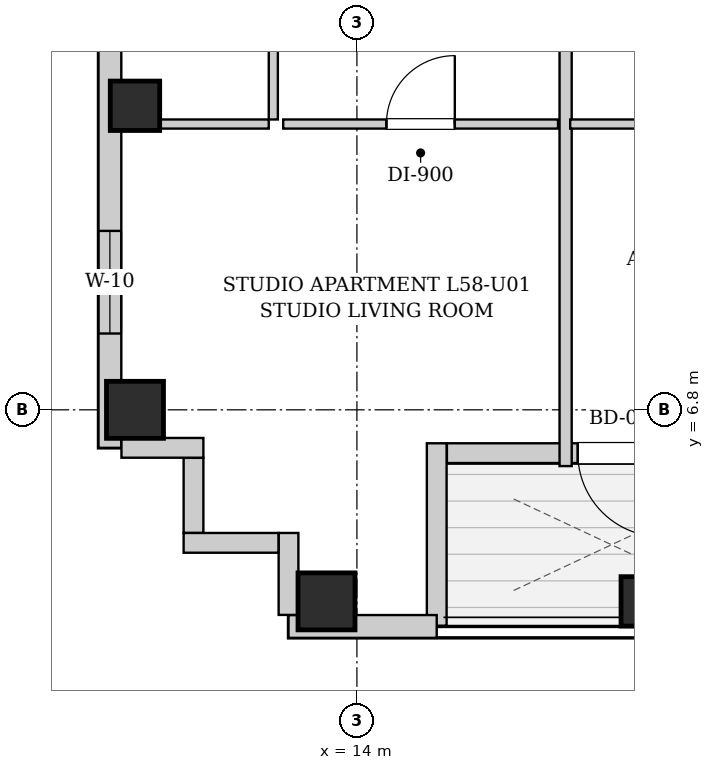
"""IFC4 building model, lengths in metres.
Left out: names, types, materials, properties, quantities, classifications, styles, units other than length and angle.
Written with IfcOpenShell. Run it as: python <this file> out.ifc"""

import sys

from ifc_helpers import new_model, si_unit, direction, frame, frame_2d, origin, origin_2d, place, context, subcontext, project, spatial, rectangle, extrude, element, fill, save


model = new_model("IFC4")
c1 = context("Model", 3, precision=1e-05, world=origin(), true_north=direction((0.0, 1.0)))
c2 = subcontext(c1, "Body", "Model", "MODEL_VIEW")
j1 = project(units=[si_unit("LENGTHUNIT", "METRE"), si_unit("PLANEANGLEUNIT", "RADIAN")], contexts=[c1])
p1 = place(None, origin())
s1 = spatial("IfcSite", under=j1, at=p1, CompositionType="ELEMENT")
p2 = place(p1, origin())
s2 = spatial("IfcBuilding", under=s1, at=p2, CompositionType="ELEMENT")
p3 = place(p2, frame((0.0, 0.0, 200.8)))
s3 = spatial("IfcBuildingStorey", under=s2, at=p3, CompositionType="ELEMENT", Elevation=200.8)
p4 = place(p3, frame((13.6, 4.28, 0.0), z_axis=(0.0, 0.0, 1.0), x_axis=(1.0, 0.0, 0.0)))
e1 = element("IfcColumn", 1, at=p4, inside=s3, PredefinedType="COLUMN", context=c2, shape_type="SweptSolid", body=[
    extrude(rectangle(XDim=0.75, YDim=0.75, at=origin_2d()), origin(), (0.0, 0.0, 1.0), 3.3),
])
p5 = place(p3, frame((17.8, 4.28, 0.0), z_axis=(0.0, 0.0, 1.0), x_axis=(1.0, 0.0, 0.0)))
e2 = element("IfcColumn", 2, at=p5, inside=s3, PredefinedType="COLUMN", context=c2, shape_type="SweptSolid", body=[
    extrude(rectangle(XDim=0.65, YDim=0.65, at=origin_2d()), origin(), (0.0, 0.0, 1.0), 3.3),
])
p6 = place(p3, frame((11.08, 6.8, 0.0), z_axis=(0.0, 0.0, 1.0), x_axis=(1.0, 0.0, 0.0)))
e3 = element("IfcColumn", 3, at=p6, inside=s3, PredefinedType="COLUMN", context=c2, shape_type="SweptSolid", body=[
    extrude(rectangle(XDim=0.75, YDim=0.75, at=origin_2d()), origin(), (0.0, 0.0, 1.0), 3.3),
])
p7 = place(p3, frame((11.08, 10.8, 0.0), z_axis=(0.0, 0.0, 1.0), x_axis=(1.0, 0.0, 0.0)))
e4 = element("IfcColumn", 4, at=p7, inside=s3, PredefinedType="COLUMN", context=c2, shape_type="SweptSolid", body=[
    extrude(rectangle(XDim=0.65, YDim=0.65, at=origin_2d()), origin(), (0.0, 0.0, 1.0), 3.3),
])
p8 = place(p3, frame((19.516, 6.23, 0.0), z_axis=(0.0, 0.0, 1.0), x_axis=(-1.0, 0.0, 0.0)))
e5 = element("IfcWall", 5, at=p8, inside=s3, PredefinedType="SOLIDWALL", context=c2, shape_type="SweptSolid", body=[
    extrude(rectangle(XDim=4.332, YDim=0.26, at=frame_2d((2.166, 0.0))), origin(), (0.0, 0.0, 1.0), 3.04),
])
p9 = place(p8, frame((1.51, 0.0, 0.0)))
e6 = element("IfcOpeningElement", 6, at=p9, cuts=e5, PredefinedType="OPENING", context=c2, shape_type="SweptSolid", body=[
    extrude(rectangle(XDim=1.1, YDim=2.0, at=frame_2d((0.55, 1.0))), frame((0.0, 0.14, 0.0), z_axis=(0.0, -1.0, 0.0), x_axis=(1.0, 0.0, 0.0)), (0.0, 0.0, 1.0), 0.28),
])
p10 = place(p3, frame((15.05, 6.36, 0.0), z_axis=(0.0, 0.0, 1.0), x_axis=(0.0, -1.0, 0.0)))
e7 = element("IfcWall", 7, at=p10, inside=s3, PredefinedType="SOLIDWALL", context=c2, shape_type="SweptSolid", body=[
    extrude(rectangle(XDim=2.4, YDim=0.26, at=frame_2d((1.2, 0.0))), origin(), (0.0, 0.0, 1.0), 3.04),
])
p11 = place(p3, frame((15.05, 3.95, 0.0), z_axis=(0.0, 0.0, 1.0), x_axis=(-1.0, 0.0, 0.0)))
e8 = element("IfcWall", 8, at=p11, inside=s3, PredefinedType="SOLIDWALL", context=c2, shape_type="SweptSolid", body=[
    extrude(rectangle(XDim=1.95, YDim=0.3, at=frame_2d((0.975, 0.0))), origin(), (0.0, 0.0, 1.0), 3.04),
])
p12 = place(p3, frame((10.75, 6.3, 0.0), z_axis=(0.0, 0.0, 1.0), x_axis=(0.0, 1.0, 0.0)))
e9 = element("IfcWall", 9, at=p12, inside=s3, PredefinedType="SOLIDWALL", context=c2, shape_type="SweptSolid", body=[
    extrude(rectangle(XDim=31.4, YDim=0.3, at=frame_2d((15.7, 0.0))), origin(), (0.0, 0.0, 1.0), 3.04),
])
p13 = place(p12, frame((1.504, 0.0, 0.55)))
e10 = element("IfcOpeningElement", 10, at=p13, cuts=e9, PredefinedType="OPENING", context=c2, shape_type="SweptSolid", body=[
    extrude(rectangle(XDim=1.35, YDim=1.2, at=frame_2d((0.675, 0.6))), frame((0.0, 0.16, 0.0), z_axis=(0.0, -1.0, 0.0), x_axis=(1.0, 0.0, 0.0)), (0.0, 0.0, 1.0), 0.32),
])
p14 = place(p12, frame((28.546, 0.0, 0.55)))
e11 = element("IfcOpeningElement", 11, at=p14, cuts=e9, PredefinedType="OPENING", context=c2, shape_type="SweptSolid", body=[
    extrude(rectangle(XDim=1.35, YDim=1.2, at=frame_2d((0.675, 0.6))), frame((0.0, 0.16, 0.0), z_axis=(0.0, -1.0, 0.0), x_axis=(1.0, 0.0, 0.0)), (0.0, 0.0, 1.0), 0.32),
])
p15 = place(p12, frame((11.85, 0.0, 0.55)))
e12 = element("IfcOpeningElement", 12, at=p15, cuts=e9, PredefinedType="OPENING", context=c2, shape_type="SweptSolid", body=[
    extrude(rectangle(XDim=1.35, YDim=1.2, at=frame_2d((0.675, 0.6))), frame((0.0, 0.16, 0.0), z_axis=(0.0, -1.0, 0.0), x_axis=(1.0, 0.0, 0.0)), (0.0, 0.0, 1.0), 0.32),
])
p16 = place(p12, frame((9.185, 0.0, 0.55)))
e13 = element("IfcOpeningElement", 13, at=p16, cuts=e9, PredefinedType="OPENING", context=c2, shape_type="SweptSolid", body=[
    extrude(rectangle(XDim=1.35, YDim=1.2, at=frame_2d((0.675, 0.6))), frame((0.0, 0.16, 0.0), z_axis=(0.0, -1.0, 0.0), x_axis=(1.0, 0.0, 0.0)), (0.0, 0.0, 1.0), 0.32),
])
p17 = place(p12, frame((19.006, 0.0, 0.55)))
e14 = element("IfcOpeningElement", 14, at=p17, cuts=e9, PredefinedType="OPENING", context=c2, shape_type="SweptSolid", body=[
    extrude(rectangle(XDim=1.35, YDim=1.2, at=frame_2d((0.675, 0.6))), frame((0.0, 0.16, 0.0), z_axis=(0.0, -1.0, 0.0), x_axis=(1.0, 0.0, 0.0)), (0.0, 0.0, 1.0), 0.32),
])
p18 = place(p12, frame((20.616, 0.0, 0.55)))
e15 = element("IfcOpeningElement", 15, at=p18, cuts=e9, PredefinedType="OPENING", context=c2, shape_type="SweptSolid", body=[
    extrude(rectangle(XDim=1.35, YDim=1.2, at=frame_2d((0.675, 0.6))), frame((0.0, 0.16, 0.0), z_axis=(0.0, -1.0, 0.0), x_axis=(1.0, 0.0, 0.0)), (0.0, 0.0, 1.0), 0.32),
])
p19 = place(p3, frame((13.1, 4.102, 0.0), z_axis=(0.0, 0.0, 1.0), x_axis=(0.0, 1.0, 0.0)))
e16 = element("IfcWall", 16, at=p19, inside=s3, PredefinedType="SOLIDWALL", context=c2, shape_type="SweptSolid", body=[
    extrude(rectangle(XDim=1.078, YDim=0.26, at=frame_2d((0.539, 0.0))), origin(), (0.0, 0.0, 1.0), 3.04),
])
p20 = place(p3, frame((12.968, 5.05, 0.0), z_axis=(0.0, 0.0, 1.0), x_axis=(-1.0, 0.0, 0.0)))
e17 = element("IfcWall", 17, at=p20, inside=s3, PredefinedType="SOLIDWALL", context=c2, shape_type="SweptSolid", body=[
    extrude(rectangle(XDim=1.248, YDim=0.26, at=frame_2d((0.624, 0.0))), origin(), (0.0, 0.0, 1.0), 3.04),
])
p21 = place(p3, frame((11.85, 5.182, 0.0), z_axis=(0.0, 0.0, 1.0), x_axis=(0.0, 1.0, 0.0)))
e18 = element("IfcWall", 18, at=p21, inside=s3, PredefinedType="SOLIDWALL", context=c2, shape_type="SweptSolid", body=[
    extrude(rectangle(XDim=0.986, YDim=0.26, at=frame_2d((0.493, 0.0))), origin(), (0.0, 0.0, 1.0), 3.04),
])
p22 = place(p3, frame((11.98, 6.3, 0.0), z_axis=(0.0, 0.0, 1.0), x_axis=(-1.0, 0.0, 0.0)))
e19 = element("IfcWall", 19, at=p22, inside=s3, PredefinedType="SOLIDWALL", context=c2, shape_type="SweptSolid", body=[
    extrude(rectangle(XDim=1.078, YDim=0.26, at=frame_2d((0.539, 0.0))), origin(), (0.0, 0.0, 1.0), 3.04),
])
p23 = place(p3, frame((12.9, 10.62, 0.0), z_axis=(0.0, 0.0, 1.0), x_axis=(0.0, 1.0, 0.0)))
e20 = element("IfcWall", 20, at=p23, inside=s3, PredefinedType="PARTITIONING", context=c2, shape_type="SweptSolid", body=[
    extrude(rectangle(XDim=2.85, YDim=0.12, at=frame_2d((1.425, 0.0))), origin(), (0.0, 0.0, 1.0), 3.04),
])
p24 = place(p23, frame((0.995, 0.0, 0.0)))
e21 = element("IfcOpeningElement", 21, at=p24, cuts=e20, PredefinedType="OPENING", context=c2, shape_type="SweptSolid", body=[
    extrude(rectangle(XDim=0.86, YDim=2.05, at=frame_2d((0.43, 1.025))), frame((0.0, 0.07, 0.0), z_axis=(0.0, -1.0, 0.0), x_axis=(1.0, 0.0, 0.0)), (0.0, 0.0, 1.0), 0.14),
])
p25 = place(p3, frame((10.99, 10.56, 0.0), z_axis=(0.0, 0.0, 1.0), x_axis=(1.0, 0.0, 0.0)))
e22 = element("IfcWall", 22, at=p25, inside=s3, PredefinedType="PARTITIONING", context=c2, shape_type="SweptSolid", body=[
    extrude(rectangle(XDim=1.85, YDim=0.12, at=frame_2d((0.925, 0.0))), origin(), (0.0, 0.0, 1.0), 3.04),
])
p26 = place(p3, frame((13.03, 10.56, 0.0), z_axis=(0.0, 0.0, 1.0), x_axis=(1.0, 0.0, 0.0)))
e23 = element("IfcWall", 23, at=p26, inside=s3, PredefinedType="PARTITIONING", context=c2, shape_type="SweptSolid", body=[
    extrude(rectangle(XDim=3.616, YDim=0.12, at=frame_2d((1.808, 0.0))), origin(), (0.0, 0.0, 1.0), 3.04),
])
p27 = place(p26, frame((1.358, 0.0, 0.0)))
e24 = element("IfcOpeningElement", 24, at=p27, cuts=e23, PredefinedType="OPENING", context=c2, shape_type="SweptSolid", body=[
    extrude(rectangle(XDim=0.9, YDim=2.05, at=frame_2d((0.45, 1.025))), frame((0.0, 0.07, 0.0), z_axis=(0.0, -1.0, 0.0), x_axis=(1.0, 0.0, 0.0)), (0.0, 0.0, 1.0), 0.14),
])
p28 = place(p3, frame((16.746, 6.06, 0.0), z_axis=(0.0, 0.0, 1.0), x_axis=(0.0, 1.0, 0.0)))
e25 = element("IfcWall", 25, at=p28, inside=s3, PredefinedType="PARTITIONING", context=c2, shape_type="SweptSolid", body=[
    extrude(rectangle(XDim=7.41, YDim=0.16, at=frame_2d((3.705, 0.0))), origin(), (0.0, 0.0, 1.0), 3.04),
])
p29 = place(p3, frame((16.806, 10.56, 0.0), z_axis=(0.0, 0.0, 1.0), x_axis=(1.0, 0.0, 0.0)))
e26 = element("IfcWall", 26, at=p29, inside=s3, PredefinedType="PARTITIONING", context=c2, shape_type="SweptSolid", body=[
    extrude(rectangle(XDim=2.4, YDim=0.12, at=frame_2d((1.2, 0.0))), origin(), (0.0, 0.0, 1.0), 3.04),
])
p30 = place(p27, origin())
e27 = element("IfcDoor", 27, at=p30, inside=s3, OperationType="SINGLE_SWING_RIGHT", PredefinedType="DOOR", context=c2, shape_type="SweptSolid", body=[
    extrude(rectangle(XDim=0.9, YDim=2.05, at=frame_2d((0.45, 1.025))), frame((0.0, 0.025, 0.0), z_axis=(0.0, -1.0, 0.0), x_axis=(1.0, 0.0, 0.0)), (0.0, 0.0, 1.0), 0.05),
])
fill(e24, e27)
p31 = place(p9, origin())
e28 = element("IfcDoor", 28, at=p31, inside=s3, OperationType="SINGLE_SWING_LEFT", PredefinedType="DOOR", context=c2, shape_type="SweptSolid", body=[
    extrude(rectangle(XDim=1.1, YDim=2.0, at=frame_2d((0.55, 1.0))), frame((0.0, 0.025, 0.0), z_axis=(0.0, -1.0, 0.0), x_axis=(1.0, 0.0, 0.0)), (0.0, 0.0, 1.0), 0.05),
])
fill(e6, e28)
p32 = place(p13, origin())
e29 = element("IfcWindow", 29, at=p32, inside=s3, PartitioningType="SINGLE_PANEL", PredefinedType="WINDOW", context=c2, shape_type="SweptSolid", body=[
    extrude(rectangle(XDim=1.35, YDim=1.2, at=frame_2d((0.675, 0.6))), frame((0.0, 0.03, 0.0), z_axis=(0.0, -1.0, 0.0), x_axis=(1.0, 0.0, 0.0)), (0.0, 0.0, 1.0), 0.06),
])
fill(e10, e29)
save(model, sys.argv[1])
